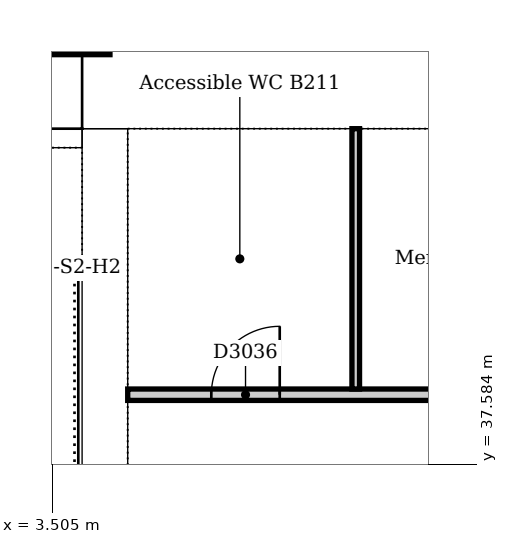
"""IFC4 building model, lengths in metres.
Left out: names, types, materials, properties, quantities, classifications, styles, units other than length and angle.
Written with IfcOpenShell. Run it as: python <this file> out.ifc"""

import sys

from ifc_helpers import new_model, si_unit, direction, frame, frame_2d, origin, origin_2d, place, context, subcontext, project, spatial, rectangle, extrude, element, fill, save


model = new_model("IFC4")
c1 = context("Model", 3, precision=1e-05, world=origin(), true_north=direction((0.0, 1.0)))
c2 = subcontext(c1, "Body", "Model", "MODEL_VIEW")
j1 = project(units=[si_unit("LENGTHUNIT", "METRE"), si_unit("PLANEANGLEUNIT", "RADIAN")], contexts=[c1])
p1 = place(None, origin())
s1 = spatial("IfcSite", under=j1, at=p1, CompositionType="ELEMENT")
p2 = place(p1, origin())
s2 = spatial("IfcBuilding", under=s1, at=p2, CompositionType="ELEMENT")
p3 = place(p2, frame((0.0, 0.0, -9.5)))
s3 = spatial("IfcBuildingStorey", under=s2, at=p3, CompositionType="ELEMENT", Elevation=-9.5)
p4 = place(p3, frame((23.7, 42.6, 0.0), z_axis=(0.0, 0.0, 1.0), x_axis=(-1.0, 0.0, 0.0)))
e1 = element("IfcWall", 1, at=p4, inside=s3, PredefinedType="SOLIDWALL", context=c2, shape_type="SweptSolid", body=[
    extrude(rectangle(XDim=19.8, YDim=1.2, at=frame_2d((9.9, 0.0))), origin(), (0.0, 0.0, 1.0), 4.5),
])
p5 = place(p3, frame((4.2, 42.0, 0.0), z_axis=(0.0, 0.0, 1.0), x_axis=(0.0, -1.0, 0.0)))
e2 = element("IfcWall", 2, at=p5, inside=s3, PredefinedType="SOLIDWALL", context=c2, shape_type="SweptSolid", body=[
    extrude(rectangle(XDim=10.5, YDim=0.6, at=frame_2d((5.25, 0.0))), origin(), (0.0, 0.0, 1.0), 4.5),
])
p6 = place(p5, frame((5.3, 0.0, 0.0)))
e3 = element("IfcOpeningElement", 3, at=p6, cuts=e2, PredefinedType="OPENING", context=c2, shape_type="SweptSolid", body=[
    extrude(rectangle(XDim=1.0, YDim=2.1, at=frame_2d((0.5, 1.05))), frame((0.0, 0.31, 0.0), z_axis=(0.0, -1.0, 0.0), x_axis=(1.0, 0.0, 0.0)), (0.0, 0.0, 1.0), 0.62),
])
p7 = place(p3, frame((3.9, 41.875, 0.0), z_axis=(0.0, 0.0, 1.0), x_axis=(-1.0, 0.0, 0.0)))
e4 = element("IfcWall", 4, at=p7, inside=s3, PredefinedType="SOLIDWALL", context=c2, shape_type="SweptSolid", body=[
    extrude(rectangle(XDim=3.54, YDim=0.25, at=frame_2d((1.77, 0.0))), origin(), (0.0, 0.0, 1.0), 4.5),
])
p8 = place(p3, frame((3.667, 43.574, 0.0), z_axis=(0.0, 0.0, 1.0), x_axis=(1.0, 0.0, 0.0)))
e5 = element("IfcColumn", 5, at=p8, inside=s3, PredefinedType="COLUMN", context=c2, shape_type="SweptSolid", body=[
    extrude(rectangle(XDim=1.2, YDim=1.2, at=origin_2d()), origin(), (0.0, 0.0, 1.0), 4.15),
])
p9 = place(p3, frame((4.5, 38.5, 0.0), z_axis=(0.0, 0.0, 1.0), x_axis=(1.0, 0.0, 0.0)))
e6 = element("IfcWall", 6, at=p9, inside=s3, PredefinedType="PARTITIONING", context=c2, shape_type="SweptSolid", body=[
    extrude(rectangle(XDim=11.9, YDim=0.15, at=frame_2d((5.95, 0.0))), origin(), (0.0, 0.0, 1.0), 4.15),
])
p10 = place(p9, frame((1.1, 0.0, 0.0)))
e7 = element("IfcOpeningElement", 7, at=p10, cuts=e6, PredefinedType="OPENING", context=c2, shape_type="SweptSolid", body=[
    extrude(rectangle(XDim=0.9, YDim=2.1, at=frame_2d((0.45, 1.05))), frame((0.0, 0.085, 0.0), z_axis=(0.0, -1.0, 0.0), x_axis=(1.0, 0.0, 0.0)), (0.0, 0.0, 1.0), 0.17),
])
p11 = place(p9, frame((4.05, 0.0, 0.0)))
e8 = element("IfcOpeningElement", 8, at=p11, cuts=e6, PredefinedType="OPENING", context=c2, shape_type="SweptSolid", body=[
    extrude(rectangle(XDim=0.9, YDim=2.1, at=frame_2d((0.45, 1.05))), frame((0.0, 0.085, 0.0), z_axis=(0.0, -1.0, 0.0), x_axis=(1.0, 0.0, 0.0)), (0.0, 0.0, 1.0), 0.17),
])
p12 = place(p9, frame((7.05, 0.0, 0.0)))
e9 = element("IfcOpeningElement", 9, at=p12, cuts=e6, PredefinedType="OPENING", context=c2, shape_type="SweptSolid", body=[
    extrude(rectangle(XDim=0.9, YDim=2.1, at=frame_2d((0.45, 1.05))), frame((0.0, 0.085, 0.0), z_axis=(0.0, -1.0, 0.0), x_axis=(1.0, 0.0, 0.0)), (0.0, 0.0, 1.0), 0.17),
])
p13 = place(p9, frame((9.95, 0.0, 0.0)))
e10 = element("IfcOpeningElement", 10, at=p13, cuts=e6, PredefinedType="OPENING", context=c2, shape_type="SweptSolid", body=[
    extrude(rectangle(XDim=0.8, YDim=2.1, at=frame_2d((0.4, 1.05))), frame((0.0, 0.085, 0.0), z_axis=(0.0, -1.0, 0.0), x_axis=(1.0, 0.0, 0.0)), (0.0, 0.0, 1.0), 0.17),
])
p14 = place(p3, frame((7.5, 38.575, 0.0), z_axis=(0.0, 0.0, 1.0), x_axis=(0.0, 1.0, 0.0)))
e11 = element("IfcWall", 11, at=p14, inside=s3, PredefinedType="PARTITIONING", context=c2, shape_type="SweptSolid", body=[
    extrude(rectangle(XDim=3.425, YDim=0.1, at=frame_2d((1.712, 0.0))), origin(), (0.0, 0.0, 1.0), 4.15),
])
p15 = place(p10, origin())
e12 = element("IfcDoor", 12, at=p15, inside=s3, OperationType="SINGLE_SWING_RIGHT", PredefinedType="DOOR", context=c2, shape_type="SweptSolid", body=[
    extrude(rectangle(XDim=0.9, YDim=2.1, at=frame_2d((0.45, 1.05))), frame((0.0, 0.025, 0.0), z_axis=(0.0, -1.0, 0.0), x_axis=(1.0, 0.0, 0.0)), (0.0, 0.0, 1.0), 0.05),
])
fill(e7, e12)
save(model, sys.argv[1])
